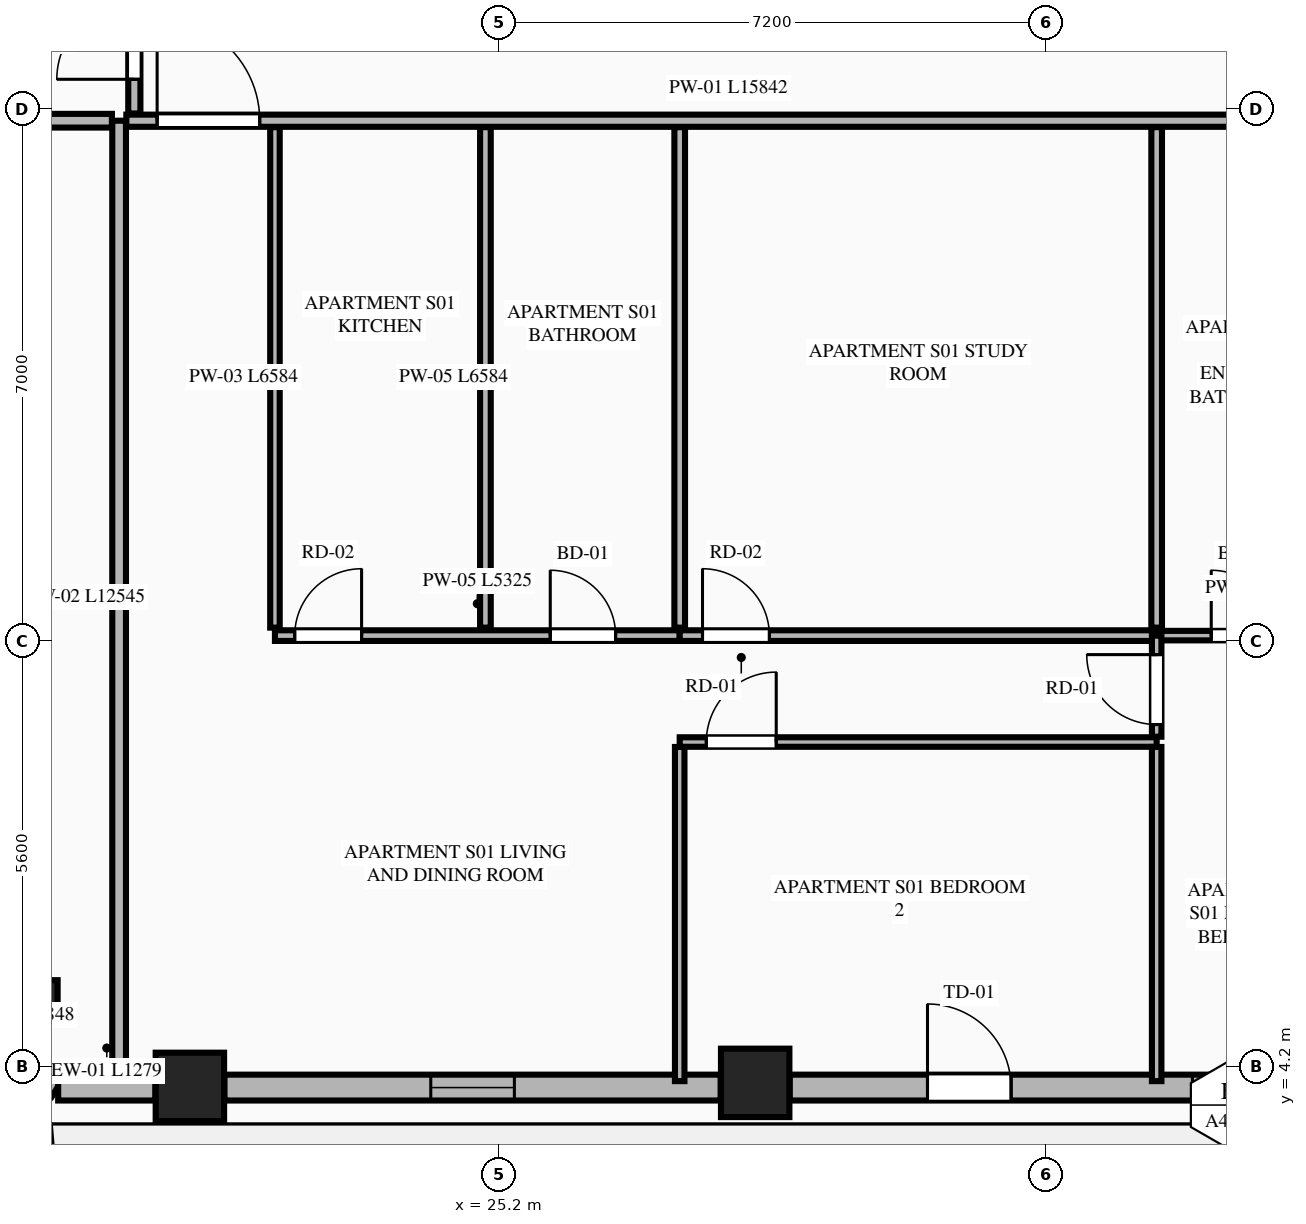
"""IFC4 building model, lengths in metres.
Left out: names, types, materials, properties, quantities, classifications, styles, units other than length and angle.
Written with IfcOpenShell. Run it as: python <this file> out.ifc"""

import sys

from ifc_helpers import new_model, si_unit, direction, frame, frame_2d, origin, origin_2d, place, context, subcontext, project, spatial, rectangle, extrude, element, fill, save


model = new_model("IFC4")
c1 = context("Model", 3, precision=1e-05, world=origin(), true_north=direction((0.0, 1.0)))
c2 = subcontext(c1, "Body", "Model", "MODEL_VIEW")
j1 = project(units=[si_unit("LENGTHUNIT", "METRE"), si_unit("PLANEANGLEUNIT", "RADIAN")], contexts=[c1])
p1 = place(None, origin())
s1 = spatial("IfcSite", under=j1, at=p1, CompositionType="ELEMENT")
p2 = place(p1, origin())
s2 = spatial("IfcBuilding", under=s1, at=p2, CompositionType="ELEMENT")
p3 = place(p2, frame((0.0, 0.0, 157.05)))
s3 = spatial("IfcBuildingStorey", under=s2, at=p3, CompositionType="ELEMENT", Elevation=157.05)
for number, where, z_axis, x_axis in (
    (1, (21.131, 3.939, 0.0), (0.0, 0.0, 1.0), (1.0, 0.0, 0.0)),
    (2, (28.568, 3.992, 0.0), (0.0, 0.0, 1.0), (1.0, 0.0, 0.0)),
):
    element("IfcColumn", number, at=place(p3, frame(where, z_axis=z_axis, x_axis=x_axis)), inside=s3, PredefinedType="COLUMN", context=c2, shape_type="SweptSolid", body=[
        extrude(rectangle(XDim=0.9, YDim=0.9, at=origin_2d()), origin(), (0.0, 0.0, 1.0), 3.55),
    ])
p4 = place(p3, frame((19.141, 5.093, 0.0), z_axis=(0.0, 0.0, 1.0), x_axis=(0.865160173452, -0.501495637342, 0.0)))
e3 = element("IfcColumn", 3, at=p4, inside=s3, PredefinedType="PILASTER", context=c2, shape_type="SweptSolid", body=[
    extrude(rectangle(XDim=0.5, YDim=0.35, at=origin_2d()), origin(), (0.0, 0.0, 1.0), 3.55),
])
p5 = place(p3, frame((17.829, 4.923, 0.0), z_axis=(0.0, 0.0, 1.0), x_axis=(0.851798915137, -0.523868884523, 0.0)))
e4 = element("IfcWall", 4, at=p5, inside=s3, PredefinedType="STANDARD", context=c2, shape_type="SweptSolid", body=[
    extrude(rectangle(XDim=1.848, YDim=0.34, at=frame_2d((0.924, 0.0))), origin(), (0.0, 0.0, 1.0), 3.34),
])
p6 = place(p3, frame((19.398, 3.93, 0.0), z_axis=(0.0, 0.0, 1.0), x_axis=(1.0, 0.0, 0.0)))
e5 = element("IfcWall", 5, at=p6, inside=s3, PredefinedType="STANDARD", context=c2, shape_type="SweptSolid", body=[
    extrude(rectangle(XDim=1.279, YDim=0.34, at=frame_2d((0.64, 0.0))), origin(), (0.0, 0.0, 1.0), 3.34),
])
p7 = place(p3, frame((21.585, 3.93, 0.0), z_axis=(0.0, 0.0, 1.0), x_axis=(1.0, 0.0, 0.0)))
e6 = element("IfcWall", 6, at=p7, inside=s3, PredefinedType="STANDARD", context=c2, shape_type="SweptSolid", body=[
    extrude(rectangle(XDim=6.529, YDim=0.34, at=frame_2d((3.265, 0.0))), origin(), (0.0, 0.0, 1.0), 2.797),
])
p8 = place(p7, frame((2.715, 0.0, 0.75)))
e7 = element("IfcOpeningElement", 7, at=p8, cuts=e6, PredefinedType="OPENING", context=c2, shape_type="SweptSolid", body=[
    extrude(rectangle(XDim=1.1, YDim=1.897, at=frame_2d((0.55, 0.948))), frame((0.0, 0.18, 0.0), z_axis=(0.0, -1.0, 0.0), x_axis=(1.0, 0.0, 0.0)), (0.0, 0.0, 1.0), 0.36),
])
p9 = place(p3, frame((29.022, 3.93, 0.0), z_axis=(0.0, 0.0, 1.0), x_axis=(1.0, 0.0, 0.0)))
e8 = element("IfcWall", 8, at=p9, inside=s3, PredefinedType="STANDARD", context=c2, shape_type="SweptSolid", body=[
    extrude(rectangle(XDim=6.756, YDim=0.34, at=frame_2d((3.378, 0.0))), origin(), (0.0, 0.0, 1.0), 2.797),
])
p10 = place(p9, frame((1.813, 0.0, 0.0)))
e9 = element("IfcOpeningElement", 9, at=p10, cuts=e8, PredefinedType="OPENING", context=c2, shape_type="SweptSolid", body=[
    extrude(rectangle(XDim=1.1, YDim=2.25, at=frame_2d((0.55, 1.125))), frame((0.0, 0.18, 0.0), z_axis=(0.0, -1.0, 0.0), x_axis=(1.0, 0.0, 0.0)), (0.0, 0.0, 1.0), 0.36),
])
p11 = place(p9, frame((5.298, 0.0, 0.75)))
e10 = element("IfcOpeningElement", 10, at=p11, cuts=e8, PredefinedType="OPENING", context=c2, shape_type="SweptSolid", body=[
    extrude(rectangle(XDim=1.1, YDim=1.897, at=frame_2d((0.55, 0.948))), frame((0.0, 0.18, 0.0), z_axis=(0.0, -1.0, 0.0), x_axis=(1.0, 0.0, 0.0)), (0.0, 0.0, 1.0), 0.36),
])
p12 = place(p3, frame((20.2, 4.105, 0.0), z_axis=(0.0, 0.0, 1.0), x_axis=(0.0, 1.0, 0.0)))
e11 = element("IfcWall", 11, at=p12, inside=s3, PredefinedType="PARTITIONING", context=c2, shape_type="SweptSolid", body=[
    extrude(rectangle(XDim=12.545, YDim=0.18, at=frame_2d((6.272, 0.0))), origin(), (0.0, 0.0, 1.0), 3.34),
])
p13 = place(p3, frame((20.295, 16.65, 0.0), z_axis=(0.0, 0.0, 1.0), x_axis=(1.0, 0.0, 0.0)))
e12 = element("IfcWall", 12, at=p13, inside=s3, PredefinedType="PARTITIONING", context=c2, shape_type="SweptSolid", body=[
    extrude(rectangle(XDim=15.842, YDim=0.16, at=frame_2d((7.921, 0.0))), origin(), (0.0, 0.0, 1.0), 3.34),
])
p14 = place(p13, frame((0.405, 0.0, 0.0)))
e13 = element("IfcOpeningElement", 13, at=p14, cuts=e12, PredefinedType="OPENING", context=c2, shape_type="SweptSolid", body=[
    extrude(rectangle(XDim=1.35, YDim=2.35, at=frame_2d((0.675, 1.175))), frame((0.0, 0.09, 0.0), z_axis=(0.0, -1.0, 0.0), x_axis=(1.0, 0.0, 0.0)), (0.0, 0.0, 1.0), 0.18),
])
p15 = place(p3, frame((22.25, 9.981, 0.0), z_axis=(0.0, 0.0, 1.0), x_axis=(0.0, 1.0, 0.0)))
e14 = element("IfcWall", 14, at=p15, inside=s3, PredefinedType="PARTITIONING", context=c2, shape_type="SweptSolid", body=[
    extrude(rectangle(XDim=6.584, YDim=0.125, at=frame_2d((3.292, 0.0))), origin(), (0.0, 0.0, 1.0), 2.722),
])
p16 = place(p3, frame((22.25, 9.876, 0.0), z_axis=(0.0, 0.0, 1.0), x_axis=(1.0, 0.0, 0.0)))
e15 = element("IfcWall", 15, at=p16, inside=s3, PredefinedType="PLUMBINGWALL", context=c2, shape_type="SweptSolid", body=[
    extrude(rectangle(XDim=5.325, YDim=0.14, at=frame_2d((2.663, 0.0))), origin(), (0.0, 0.0, 1.0), 3.34),
])
p17 = place(p16, frame((3.622, 0.0, 0.0)))
e16 = element("IfcOpeningElement", 16, at=p17, cuts=e15, PredefinedType="OPENING", context=c2, shape_type="SweptSolid", body=[
    extrude(rectangle(XDim=0.86, YDim=2.1, at=frame_2d((0.43, 1.05))), frame((0.0, 0.08, 0.0), z_axis=(0.0, -1.0, 0.0), x_axis=(1.0, 0.0, 0.0)), (0.0, 0.0, 1.0), 0.16),
])
p18 = place(p16, frame((0.26, 0.0, 0.0)))
e17 = element("IfcOpeningElement", 17, at=p18, cuts=e15, PredefinedType="OPENING", context=c2, shape_type="SweptSolid", body=[
    extrude(rectangle(XDim=0.88, YDim=2.15, at=frame_2d((0.44, 1.075))), frame((0.0, 0.08, 0.0), z_axis=(0.0, -1.0, 0.0), x_axis=(1.0, 0.0, 0.0)), (0.0, 0.0, 1.0), 0.16),
])
p19 = place(p3, frame((27.575, 9.876, 0.0), z_axis=(0.0, 0.0, 1.0), x_axis=(1.0, 0.0, 0.0)))
e18 = element("IfcWall", 18, at=p19, inside=s3, PredefinedType="PLUMBINGWALL", context=c2, shape_type="SweptSolid", body=[
    extrude(rectangle(XDim=6.275, YDim=0.14, at=frame_2d((3.138, 0.0))), origin(), (0.0, 0.0, 1.0), 3.34),
])
p20 = place(p19, frame((0.3, 0.0, 0.0)))
e19 = element("IfcOpeningElement", 19, at=p20, cuts=e18, PredefinedType="OPENING", context=c2, shape_type="SweptSolid", body=[
    extrude(rectangle(XDim=0.88, YDim=2.15, at=frame_2d((0.44, 1.075))), frame((0.0, 0.08, 0.0), z_axis=(0.0, -1.0, 0.0), x_axis=(1.0, 0.0, 0.0)), (0.0, 0.0, 1.0), 0.16),
])
p21 = place(p3, frame((33.85, 9.876, 0.0), z_axis=(0.0, 0.0, 1.0), x_axis=(1.0, 0.0, 0.0)))
e20 = element("IfcWall", 20, at=p21, inside=s3, PredefinedType="PARTITIONING", context=c2, shape_type="SweptSolid", body=[
    extrude(rectangle(XDim=2.287, YDim=0.125, at=frame_2d((1.144, 0.0))), origin(), (0.0, 0.0, 1.0), 3.34),
])
p22 = place(p21, frame((0.718, 0.0, 0.0)))
e21 = element("IfcOpeningElement", 21, at=p22, cuts=e20, PredefinedType="OPENING", context=c2, shape_type="SweptSolid", body=[
    extrude(rectangle(XDim=0.86, YDim=2.1, at=frame_2d((0.43, 1.05))), frame((0.0, 0.073, 0.0), z_axis=(0.0, -1.0, 0.0), x_axis=(1.0, 0.0, 0.0)), (0.0, 0.0, 1.0), 0.145),
])
p23 = place(p3, frame((25.019, 9.981, 0.0), z_axis=(0.0, 0.0, 1.0), x_axis=(0.0, 1.0, 0.0)))
e22 = element("IfcWall", 22, at=p23, inside=s3, PredefinedType="PLUMBINGWALL", context=c2, shape_type="SweptSolid", body=[
    extrude(rectangle(XDim=6.584, YDim=0.14, at=frame_2d((3.292, 0.0))), origin(), (0.0, 0.0, 1.0), 3.34),
])
p24 = place(p3, frame((27.575, 4.015, 0.0), z_axis=(0.0, 0.0, 1.0), x_axis=(0.0, 1.0, 0.0)))
e23 = element("IfcWall", 23, at=p24, inside=s3, PredefinedType="PARTITIONING", context=c2, shape_type="SweptSolid", body=[
    extrude(rectangle(XDim=4.396, YDim=0.125, at=frame_2d((2.198, 0.0))), origin(), (0.0, 0.0, 1.0), 3.34),
])
p25 = place(p3, frame((27.575, 8.476, 0.0), z_axis=(0.0, 0.0, 1.0), x_axis=(1.0, 0.0, 0.0)))
e24 = element("IfcWall", 24, at=p25, inside=s3, PredefinedType="PARTITIONING", context=c2, shape_type="SweptSolid", body=[
    extrude(rectangle(XDim=6.275, YDim=0.125, at=frame_2d((3.138, 0.0))), origin(), (0.0, 0.0, 1.0), 3.34),
])
p26 = place(p25, frame((0.35, 0.0, 0.0)))
e25 = element("IfcOpeningElement", 25, at=p26, cuts=e24, PredefinedType="OPENING", context=c2, shape_type="SweptSolid", body=[
    extrude(rectangle(XDim=0.92, YDim=2.15, at=frame_2d((0.46, 1.075))), frame((0.0, 0.073, 0.0), z_axis=(0.0, -1.0, 0.0), x_axis=(1.0, 0.0, 0.0)), (0.0, 0.0, 1.0), 0.145),
])
p27 = place(p3, frame((33.85, 8.546, 0.0), z_axis=(0.0, 0.0, 1.0), x_axis=(0.0, 1.0, 0.0)))
e26 = element("IfcWall", 26, at=p27, inside=s3, PredefinedType="PARTITIONING", context=c2, shape_type="SweptSolid", body=[
    extrude(rectangle(XDim=1.33, YDim=0.125, at=frame_2d((0.665, 0.0))), origin(), (0.0, 0.0, 1.0), 3.34),
])
p28 = place(p27, frame((0.16, 0.0, 0.0)))
e27 = element("IfcOpeningElement", 27, at=p28, cuts=e26, PredefinedType="OPENING", context=c2, shape_type="SweptSolid", body=[
    extrude(rectangle(XDim=0.92, YDim=2.15, at=frame_2d((0.46, 1.075))), frame((0.0, 0.073, 0.0), z_axis=(0.0, -1.0, 0.0), x_axis=(1.0, 0.0, 0.0)), (0.0, 0.0, 1.0), 0.145),
])
for number, where, z_axis, x_axis in (
    (28, (27.575, 9.981, 0.0), (0.0, 0.0, 1.0), (0.0, 1.0, 0.0)),
    (29, (33.85, 9.981, 0.0), (0.0, 0.0, 1.0), (0.0, 1.0, 0.0)),
):
    element("IfcWall", number, at=place(p3, frame(where, z_axis=z_axis, x_axis=x_axis)), inside=s3, PredefinedType="PLUMBINGWALL", context=c2, shape_type="SweptSolid", body=[
        extrude(rectangle(XDim=6.584, YDim=0.14, at=frame_2d((3.292, 0.0))), origin(), (0.0, 0.0, 1.0), 3.34),
    ])
p29 = place(p3, frame((33.85, 4.015, 0.0), z_axis=(0.0, 0.0, 1.0), x_axis=(0.0, 1.0, 0.0)))
e30 = element("IfcWall", 30, at=p29, inside=s3, PredefinedType="PARTITIONING", context=c2, shape_type="SweptSolid", body=[
    extrude(rectangle(XDim=4.396, YDim=0.125, at=frame_2d((2.198, 0.0))), origin(), (0.0, 0.0, 1.0), 3.34),
])
p30 = place(p3, frame((12.109, 16.65, 0.0), z_axis=(0.0, 0.0, 1.0), x_axis=(1.0, 0.0, 0.0)))
e31 = element("IfcWall", 31, at=p30, inside=s3, PredefinedType="PARTITIONING", context=c2, shape_type="SweptSolid", body=[
    extrude(rectangle(XDim=7.996, YDim=0.18, at=frame_2d((3.998, 0.0))), origin(), (0.0, 0.0, 1.0), 3.34),
])
p31 = place(p3, frame((20.4, 16.745, 0.0), z_axis=(0.0, 0.0, 1.0), x_axis=(0.0, 1.0, 0.0)))
e32 = element("IfcWall", 32, at=p31, inside=s3, PredefinedType="PARTITIONING", context=c2, shape_type="SweptSolid", body=[
    extrude(rectangle(XDim=18.31, YDim=0.16, at=frame_2d((9.155, 0.0))), origin(), (0.0, 0.0, 1.0), 3.34),
])
p32 = place(p31, frame((0.45, 0.0, 0.0)))
e33 = element("IfcOpeningElement", 33, at=p32, cuts=e32, PredefinedType="OPENING", context=c2, shape_type="SweptSolid", body=[
    extrude(rectangle(XDim=1.02, YDim=2.25, at=frame_2d((0.51, 1.125))), frame((0.0, 0.09, 0.0), z_axis=(0.0, -1.0, 0.0), x_axis=(1.0, 0.0, 0.0)), (0.0, 0.0, 1.0), 0.18),
])
p33 = place(p8, origin())
e34 = element("IfcWindow", 34, at=p33, inside=s3, PartitioningType="SINGLE_PANEL", PredefinedType="WINDOW", context=c2, shape_type="SweptSolid", body=[
    extrude(rectangle(XDim=1.1, YDim=1.897, at=frame_2d((0.55, 0.948))), frame((0.0, 0.03, 0.0), z_axis=(0.0, -1.0, 0.0), x_axis=(1.0, 0.0, 0.0)), (0.0, 0.0, 1.0), 0.06),
])
fill(e7, e34)
p34 = place(p10, origin())
e35 = element("IfcDoor", 35, at=p34, inside=s3, OperationType="SINGLE_SWING_LEFT", PredefinedType="DOOR", context=c2, shape_type="SweptSolid", body=[
    extrude(rectangle(XDim=1.1, YDim=2.25, at=frame_2d((0.55, 1.125))), frame((0.0, 0.025, 0.0), z_axis=(0.0, -1.0, 0.0), x_axis=(1.0, 0.0, 0.0)), (0.0, 0.0, 1.0), 0.05),
])
fill(e9, e35)
p35 = place(p17, origin())
e36 = element("IfcDoor", 36, at=p35, inside=s3, OperationType="SINGLE_SWING_LEFT", PredefinedType="DOOR", context=c2, shape_type="SweptSolid", body=[
    extrude(rectangle(XDim=0.86, YDim=2.1, at=frame_2d((0.43, 1.05))), frame((0.0, 0.025, 0.0), z_axis=(0.0, -1.0, 0.0), x_axis=(1.0, 0.0, 0.0)), (0.0, 0.0, 1.0), 0.05),
])
fill(e16, e36)
p36 = place(p22, origin())
e37 = element("IfcDoor", 37, at=p36, inside=s3, OperationType="SINGLE_SWING_LEFT", PredefinedType="DOOR", context=c2, shape_type="SweptSolid", body=[
    extrude(rectangle(XDim=0.86, YDim=2.1, at=frame_2d((0.43, 1.05))), frame((0.0, 0.025, 0.0), z_axis=(0.0, -1.0, 0.0), x_axis=(1.0, 0.0, 0.0)), (0.0, 0.0, 1.0), 0.05),
])
fill(e21, e37)
p37 = place(p14, origin())
e38 = element("IfcDoor", 38, at=p37, inside=s3, OperationType="SINGLE_SWING_LEFT", PredefinedType="DOOR", context=c2, shape_type="SweptSolid", body=[
    extrude(rectangle(XDim=1.35, YDim=2.35, at=frame_2d((0.675, 1.175))), frame((0.0, 0.025, 0.0), z_axis=(0.0, -1.0, 0.0), x_axis=(1.0, 0.0, 0.0)), (0.0, 0.0, 1.0), 0.05),
])
fill(e13, e38)
p38 = place(p18, origin())
e39 = element("IfcDoor", 39, at=p38, inside=s3, OperationType="SINGLE_SWING_RIGHT", PredefinedType="DOOR", context=c2, shape_type="SweptSolid", body=[
    extrude(rectangle(XDim=0.88, YDim=2.15, at=frame_2d((0.44, 1.075))), frame((0.0, 0.025, 0.0), z_axis=(0.0, -1.0, 0.0), x_axis=(1.0, 0.0, 0.0)), (0.0, 0.0, 1.0), 0.05),
])
fill(e17, e39)
p39 = place(p20, origin())
e40 = element("IfcDoor", 40, at=p39, inside=s3, OperationType="SINGLE_SWING_LEFT", PredefinedType="DOOR", context=c2, shape_type="SweptSolid", body=[
    extrude(rectangle(XDim=0.88, YDim=2.15, at=frame_2d((0.44, 1.075))), frame((0.0, 0.025, 0.0), z_axis=(0.0, -1.0, 0.0), x_axis=(1.0, 0.0, 0.0)), (0.0, 0.0, 1.0), 0.05),
])
fill(e19, e40)
p40 = place(p26, origin())
e41 = element("IfcDoor", 41, at=p40, inside=s3, OperationType="SINGLE_SWING_RIGHT", PredefinedType="DOOR", context=c2, shape_type="SweptSolid", body=[
    extrude(rectangle(XDim=0.92, YDim=2.15, at=frame_2d((0.46, 1.075))), frame((0.0, 0.025, 0.0), z_axis=(0.0, -1.0, 0.0), x_axis=(1.0, 0.0, 0.0)), (0.0, 0.0, 1.0), 0.05),
])
fill(e25, e41)
p41 = place(p28, origin())
e42 = element("IfcDoor", 42, at=p41, inside=s3, OperationType="SINGLE_SWING_RIGHT", PredefinedType="DOOR", context=c2, shape_type="SweptSolid", body=[
    extrude(rectangle(XDim=0.92, YDim=2.15, at=frame_2d((0.46, 1.075))), frame((0.0, 0.025, 0.0), z_axis=(0.0, -1.0, 0.0), x_axis=(1.0, 0.0, 0.0)), (0.0, 0.0, 1.0), 0.05),
])
fill(e27, e42)
p42 = place(p32, origin())
e43 = element("IfcDoor", 43, at=p42, inside=s3, OperationType="SINGLE_SWING_LEFT", PredefinedType="DOOR", context=c2, shape_type="SweptSolid", body=[
    extrude(rectangle(XDim=1.02, YDim=2.25, at=frame_2d((0.51, 1.125))), frame((0.0, 0.025, 0.0), z_axis=(0.0, -1.0, 0.0), x_axis=(1.0, 0.0, 0.0)), (0.0, 0.0, 1.0), 0.05),
])
fill(e33, e43)
p43 = place(p11, origin())
e44 = element("IfcWindow", 44, at=p43, inside=s3, PartitioningType="SINGLE_PANEL", PredefinedType="WINDOW", context=c2, shape_type="SweptSolid", body=[
    extrude(rectangle(XDim=1.1, YDim=1.897, at=frame_2d((0.55, 0.948))), frame((0.0, 0.03, 0.0), z_axis=(0.0, -1.0, 0.0), x_axis=(1.0, 0.0, 0.0)), (0.0, 0.0, 1.0), 0.06),
])
fill(e10, e44)
save(model, sys.argv[1])
